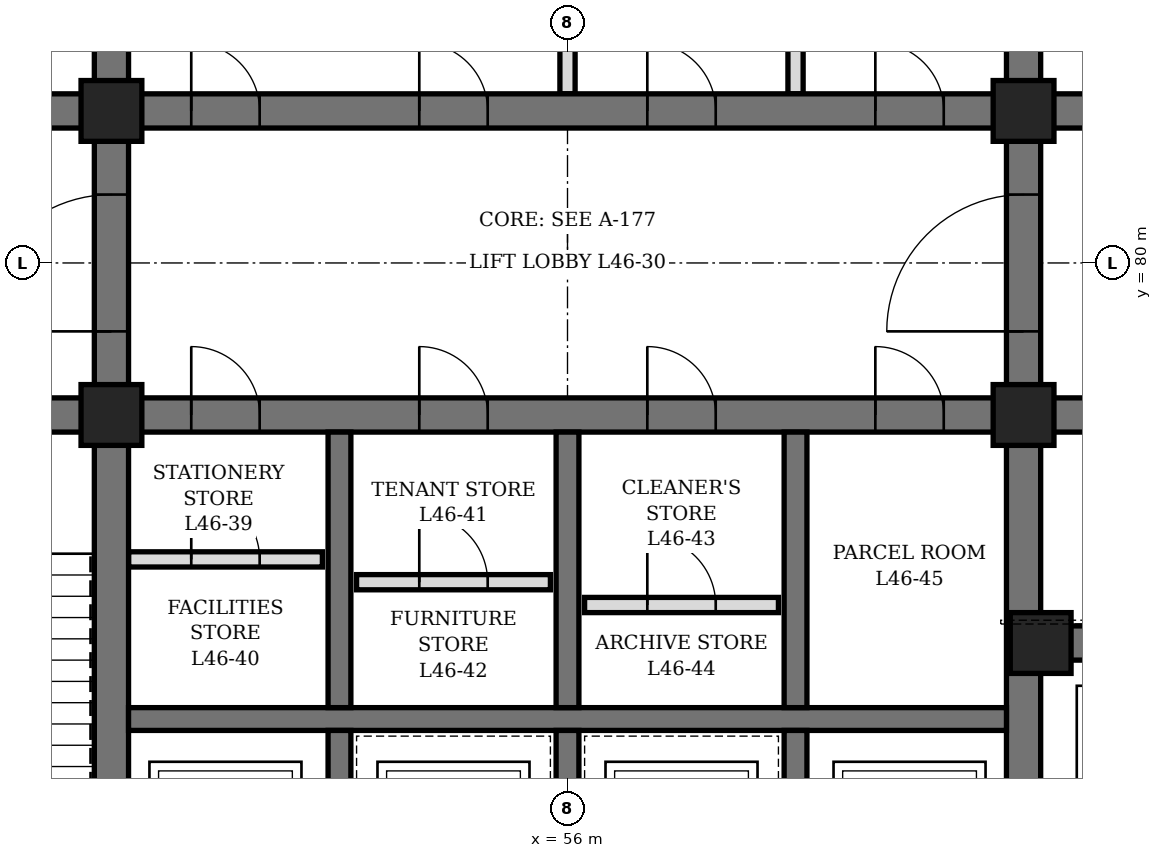
"""IFC4 building model, lengths in metres.
Left out: names, types, materials, properties, quantities, classifications, styles, units other than length and angle.
Written with IfcOpenShell. Run it as: python <this file> out.ifc"""

import sys

from ifc_helpers import new_model, si_unit, direction, frame, frame_2d, origin, origin_2d, place, context, subcontext, project, spatial, rectangle, hollow_rectangle, extrude, element, fill, save


model = new_model("IFC4")
c1 = context("Model", 3, precision=1e-05, world=origin(), true_north=direction((0.0, 1.0)))
c2 = subcontext(c1, "Body", "Model", "MODEL_VIEW")
j1 = project(units=[si_unit("LENGTHUNIT", "METRE"), si_unit("PLANEANGLEUNIT", "RADIAN")], contexts=[c1])
p1 = place(None, origin())
s1 = spatial("IfcSite", under=j1, at=p1, CompositionType="ELEMENT")
p2 = place(p1, origin())
s2 = spatial("IfcBuilding", under=s1, at=p2, CompositionType="ELEMENT")
p3 = place(p2, frame((0.0, 0.0, 206.5)))
s3 = spatial("IfcBuildingStorey", under=s2, at=p3, CompositionType="ELEMENT", Elevation=206.5)
p4 = place(p3, frame((50.0, 71.6, 0.0), z_axis=(0.0, 0.0, 1.0), x_axis=(0.0, 1.0, 0.0)))
e1 = element("IfcWall", 1, at=p4, inside=s3, PredefinedType="SHEAR", context=c2, shape_type="SweptSolid", body=[
    extrude(rectangle(XDim=16.8, YDim=0.45, at=frame_2d((8.4, 0.0))), origin(), (0.0, 0.0, 1.0), 4.2),
])
p5 = place(p4, frame((7.5, 0.0, 0.0)))
e2 = element("IfcOpeningElement", 2, at=p5, cuts=e1, PredefinedType="OPENING", context=c2, shape_type="SweptSolid", body=[
    extrude(rectangle(XDim=1.8, YDim=2.4, at=frame_2d((0.9, 1.2))), frame((0.0, 0.235, 0.0), z_axis=(0.0, -1.0, 0.0), x_axis=(1.0, 0.0, 0.0)), (0.0, 0.0, 1.0), 0.47),
])
p6 = place(p3, frame((62.0, 71.6, 0.0), z_axis=(0.0, 0.0, 1.0), x_axis=(0.0, 1.0, 0.0)))
e3 = element("IfcWall", 3, at=p6, inside=s3, PredefinedType="SHEAR", context=c2, shape_type="SweptSolid", body=[
    extrude(rectangle(XDim=16.8, YDim=0.45, at=frame_2d((8.4, 0.0))), origin(), (0.0, 0.0, 1.0), 4.2),
])
p7 = place(p6, frame((7.5, 0.0, 0.0)))
e4 = element("IfcOpeningElement", 4, at=p7, cuts=e3, PredefinedType="OPENING", context=c2, shape_type="SweptSolid", body=[
    extrude(rectangle(XDim=1.8, YDim=2.4, at=frame_2d((0.9, 1.2))), frame((0.0, 0.235, 0.0), z_axis=(0.0, -1.0, 0.0), x_axis=(1.0, 0.0, 0.0)), (0.0, 0.0, 1.0), 0.47),
])
p8 = place(p3, frame((44.6, 78.0, 0.0), z_axis=(0.0, 0.0, 1.0), x_axis=(1.0, 0.0, 0.0)))
e5 = element("IfcWall", 5, at=p8, inside=s3, PredefinedType="SHEAR", context=c2, shape_type="SweptSolid", body=[
    extrude(rectangle(XDim=5.175, YDim=0.45, at=frame_2d((2.587, 0.0))), origin(), (0.0, 0.0, 1.0), 4.2),
])
p9 = place(p8, frame((1.8, 0.0, 0.0)))
e6 = element("IfcOpeningElement", 6, at=p9, cuts=e5, PredefinedType="OPENING", context=c2, shape_type="SweptSolid", body=[
    extrude(rectangle(XDim=1.2, YDim=2.1, at=frame_2d((0.6, 1.05))), frame((0.0, 0.235, 0.0), z_axis=(0.0, -1.0, 0.0), x_axis=(1.0, 0.0, 0.0)), (0.0, 0.0, 1.0), 0.47),
])
p10 = place(p3, frame((44.6, 82.0, 0.0), z_axis=(0.0, 0.0, 1.0), x_axis=(1.0, 0.0, 0.0)))
e7 = element("IfcWall", 7, at=p10, inside=s3, PredefinedType="SHEAR", context=c2, shape_type="SweptSolid", body=[
    extrude(rectangle(XDim=5.175, YDim=0.45, at=frame_2d((2.587, 0.0))), origin(), (0.0, 0.0, 1.0), 4.2),
])
p11 = place(p10, frame((0.7, 0.0, 0.0)))
e8 = element("IfcOpeningElement", 8, at=p11, cuts=e7, PredefinedType="OPENING", context=c2, shape_type="SweptSolid", body=[
    extrude(rectangle(XDim=0.9, YDim=2.1, at=frame_2d((0.45, 1.05))), frame((0.0, 0.235, 0.0), z_axis=(0.0, -1.0, 0.0), x_axis=(1.0, 0.0, 0.0)), (0.0, 0.0, 1.0), 0.47),
])
p12 = place(p3, frame((62.225, 75.0, 0.0), z_axis=(0.0, 0.0, 1.0), x_axis=(1.0, 0.0, 0.0)))
e9 = element("IfcWall", 9, at=p12, inside=s3, PredefinedType="SHEAR", context=c2, shape_type="SweptSolid", body=[
    extrude(rectangle(XDim=5.175, YDim=0.45, at=frame_2d((2.587, 0.0))), origin(), (0.0, 0.0, 1.0), 4.2),
])
p13 = place(p12, frame((0.675, 0.0, 0.0)))
e10 = element("IfcOpeningElement", 10, at=p13, cuts=e9, PredefinedType="OPENING", context=c2, shape_type="SweptSolid", body=[
    extrude(rectangle(XDim=1.2, YDim=2.2, at=frame_2d((0.6, 1.1))), frame((0.0, 0.235, 0.0), z_axis=(0.0, -1.0, 0.0), x_axis=(1.0, 0.0, 0.0)), (0.0, 0.0, 1.0), 0.47),
])
p14 = place(p12, frame((3.425, 0.0, 0.0)))
e11 = element("IfcOpeningElement", 11, at=p14, cuts=e9, PredefinedType="OPENING", context=c2, shape_type="SweptSolid", body=[
    extrude(rectangle(XDim=1.2, YDim=2.2, at=frame_2d((0.6, 1.1))), frame((0.0, 0.235, 0.0), z_axis=(0.0, -1.0, 0.0), x_axis=(1.0, 0.0, 0.0)), (0.0, 0.0, 1.0), 0.47),
])
p15 = place(p3, frame((62.225, 78.0, 0.0), z_axis=(0.0, 0.0, 1.0), x_axis=(1.0, 0.0, 0.0)))
e12 = element("IfcWall", 12, at=p15, inside=s3, PredefinedType="SHEAR", context=c2, shape_type="SweptSolid", body=[
    extrude(rectangle(XDim=5.175, YDim=0.45, at=frame_2d((2.587, 0.0))), origin(), (0.0, 0.0, 1.0), 4.2),
])
p16 = place(p15, frame((2.175, 0.0, 0.0)))
e13 = element("IfcOpeningElement", 13, at=p16, cuts=e12, PredefinedType="OPENING", context=c2, shape_type="SweptSolid", body=[
    extrude(rectangle(XDim=1.2, YDim=2.1, at=frame_2d((0.6, 1.05))), frame((0.0, 0.235, 0.0), z_axis=(0.0, -1.0, 0.0), x_axis=(1.0, 0.0, 0.0)), (0.0, 0.0, 1.0), 0.47),
])
p17 = place(p3, frame((62.225, 82.0, 0.0), z_axis=(0.0, 0.0, 1.0), x_axis=(1.0, 0.0, 0.0)))
e14 = element("IfcWall", 14, at=p17, inside=s3, PredefinedType="SHEAR", context=c2, shape_type="SweptSolid", body=[
    extrude(rectangle(XDim=5.175, YDim=0.45, at=frame_2d((2.587, 0.0))), origin(), (0.0, 0.0, 1.0), 4.2),
])
p18 = place(p17, frame((2.175, 0.0, 0.0)))
e15 = element("IfcOpeningElement", 15, at=p18, cuts=e14, PredefinedType="OPENING", context=c2, shape_type="SweptSolid", body=[
    extrude(rectangle(XDim=1.2, YDim=2.1, at=frame_2d((0.6, 1.05))), frame((0.0, 0.235, 0.0), z_axis=(0.0, -1.0, 0.0), x_axis=(1.0, 0.0, 0.0)), (0.0, 0.0, 1.0), 0.47),
])
p19 = place(p3, frame((50.225, 78.0, 0.0), z_axis=(0.0, 0.0, 1.0), x_axis=(1.0, 0.0, 0.0)))
e16 = element("IfcWall", 16, at=p19, inside=s3, PredefinedType="SHEAR", context=c2, shape_type="SweptSolid", body=[
    extrude(rectangle(XDim=11.55, YDim=0.45, at=frame_2d((5.775, 0.0))), origin(), (0.0, 0.0, 1.0), 4.2),
])
p20 = place(p19, frame((0.825, 0.0, 0.0)))
e17 = element("IfcOpeningElement", 17, at=p20, cuts=e16, PredefinedType="OPENING", context=c2, shape_type="SweptSolid", body=[
    extrude(rectangle(XDim=0.9, YDim=2.1, at=frame_2d((0.45, 1.05))), frame((0.0, 0.235, 0.0), z_axis=(0.0, -1.0, 0.0), x_axis=(1.0, 0.0, 0.0)), (0.0, 0.0, 1.0), 0.47),
])
p21 = place(p19, frame((3.825, 0.0, 0.0)))
e18 = element("IfcOpeningElement", 18, at=p21, cuts=e16, PredefinedType="OPENING", context=c2, shape_type="SweptSolid", body=[
    extrude(rectangle(XDim=0.9, YDim=2.1, at=frame_2d((0.45, 1.05))), frame((0.0, 0.235, 0.0), z_axis=(0.0, -1.0, 0.0), x_axis=(1.0, 0.0, 0.0)), (0.0, 0.0, 1.0), 0.47),
])
p22 = place(p19, frame((6.825, 0.0, 0.0)))
e19 = element("IfcOpeningElement", 19, at=p22, cuts=e16, PredefinedType="OPENING", context=c2, shape_type="SweptSolid", body=[
    extrude(rectangle(XDim=0.9, YDim=2.1, at=frame_2d((0.45, 1.05))), frame((0.0, 0.235, 0.0), z_axis=(0.0, -1.0, 0.0), x_axis=(1.0, 0.0, 0.0)), (0.0, 0.0, 1.0), 0.47),
])
p23 = place(p19, frame((9.825, 0.0, 0.0)))
e20 = element("IfcOpeningElement", 20, at=p23, cuts=e16, PredefinedType="OPENING", context=c2, shape_type="SweptSolid", body=[
    extrude(rectangle(XDim=0.9, YDim=2.1, at=frame_2d((0.45, 1.05))), frame((0.0, 0.235, 0.0), z_axis=(0.0, -1.0, 0.0), x_axis=(1.0, 0.0, 0.0)), (0.0, 0.0, 1.0), 0.47),
])
p24 = place(p3, frame((50.225, 82.0, 0.0), z_axis=(0.0, 0.0, 1.0), x_axis=(1.0, 0.0, 0.0)))
e21 = element("IfcWall", 21, at=p24, inside=s3, PredefinedType="SHEAR", context=c2, shape_type="SweptSolid", body=[
    extrude(rectangle(XDim=11.55, YDim=0.45, at=frame_2d((5.775, 0.0))), origin(), (0.0, 0.0, 1.0), 4.2),
])
p25 = place(p24, frame((0.825, 0.0, 0.0)))
e22 = element("IfcOpeningElement", 22, at=p25, cuts=e21, PredefinedType="OPENING", context=c2, shape_type="SweptSolid", body=[
    extrude(rectangle(XDim=0.9, YDim=2.1, at=frame_2d((0.45, 1.05))), frame((0.0, 0.235, 0.0), z_axis=(0.0, -1.0, 0.0), x_axis=(1.0, 0.0, 0.0)), (0.0, 0.0, 1.0), 0.47),
])
p26 = place(p24, frame((3.825, 0.0, 0.0)))
e23 = element("IfcOpeningElement", 23, at=p26, cuts=e21, PredefinedType="OPENING", context=c2, shape_type="SweptSolid", body=[
    extrude(rectangle(XDim=0.9, YDim=2.1, at=frame_2d((0.45, 1.05))), frame((0.0, 0.235, 0.0), z_axis=(0.0, -1.0, 0.0), x_axis=(1.0, 0.0, 0.0)), (0.0, 0.0, 1.0), 0.47),
])
p27 = place(p24, frame((6.825, 0.0, 0.0)))
e24 = element("IfcOpeningElement", 24, at=p27, cuts=e21, PredefinedType="OPENING", context=c2, shape_type="SweptSolid", body=[
    extrude(rectangle(XDim=0.9, YDim=2.1, at=frame_2d((0.45, 1.05))), frame((0.0, 0.235, 0.0), z_axis=(0.0, -1.0, 0.0), x_axis=(1.0, 0.0, 0.0)), (0.0, 0.0, 1.0), 0.47),
])
p28 = place(p24, frame((9.825, 0.0, 0.0)))
e25 = element("IfcOpeningElement", 25, at=p28, cuts=e21, PredefinedType="OPENING", context=c2, shape_type="SweptSolid", body=[
    extrude(rectangle(XDim=0.9, YDim=2.1, at=frame_2d((0.45, 1.05))), frame((0.0, 0.235, 0.0), z_axis=(0.0, -1.0, 0.0), x_axis=(1.0, 0.0, 0.0)), (0.0, 0.0, 1.0), 0.47),
])
p29 = place(p3, frame((50.225, 74.0, 0.0), z_axis=(0.0, 0.0, 1.0), x_axis=(1.0, 0.0, 0.0)))
e26 = element("IfcWall", 26, at=p29, inside=s3, PredefinedType="SHEAR", context=c2, shape_type="SweptSolid", body=[
    extrude(rectangle(XDim=11.55, YDim=0.3, at=frame_2d((5.775, 0.0))), origin(), (0.0, 0.0, 1.0), 4.2),
])
p30 = place(p3, frame((53.0, 71.6, 0.0), z_axis=(0.0, 0.0, 1.0), x_axis=(0.0, 1.0, 0.0)))
e27 = element("IfcWall", 27, at=p30, inside=s3, PredefinedType="SHEAR", context=c2, shape_type="SweptSolid", body=[
    extrude(rectangle(XDim=2.25, YDim=0.3, at=frame_2d((1.125, 0.0))), origin(), (0.0, 0.0, 1.0), 4.2),
])
p31 = place(p3, frame((53.0, 74.15, 0.0), z_axis=(0.0, 0.0, 1.0), x_axis=(0.0, 1.0, 0.0)))
e28 = element("IfcWall", 28, at=p31, inside=s3, PredefinedType="SHEAR", context=c2, shape_type="SweptSolid", body=[
    extrude(rectangle(XDim=3.625, YDim=0.3, at=frame_2d((1.812, 0.0))), origin(), (0.0, 0.0, 1.0), 4.2),
])
p32 = place(p3, frame((56.0, 71.6, 0.0), z_axis=(0.0, 0.0, 1.0), x_axis=(0.0, 1.0, 0.0)))
e29 = element("IfcWall", 29, at=p32, inside=s3, PredefinedType="SHEAR", context=c2, shape_type="SweptSolid", body=[
    extrude(rectangle(XDim=2.25, YDim=0.3, at=frame_2d((1.125, 0.0))), origin(), (0.0, 0.0, 1.0), 4.2),
])
p33 = place(p3, frame((56.0, 74.15, 0.0), z_axis=(0.0, 0.0, 1.0), x_axis=(0.0, 1.0, 0.0)))
e30 = element("IfcWall", 30, at=p33, inside=s3, PredefinedType="SHEAR", context=c2, shape_type="SweptSolid", body=[
    extrude(rectangle(XDim=3.625, YDim=0.3, at=frame_2d((1.812, 0.0))), origin(), (0.0, 0.0, 1.0), 4.2),
])
p34 = place(p3, frame((59.0, 71.6, 0.0), z_axis=(0.0, 0.0, 1.0), x_axis=(0.0, 1.0, 0.0)))
e31 = element("IfcWall", 31, at=p34, inside=s3, PredefinedType="SHEAR", context=c2, shape_type="SweptSolid", body=[
    extrude(rectangle(XDim=2.25, YDim=0.3, at=frame_2d((1.125, 0.0))), origin(), (0.0, 0.0, 1.0), 4.2),
])
p35 = place(p3, frame((59.0, 74.15, 0.0), z_axis=(0.0, 0.0, 1.0), x_axis=(0.0, 1.0, 0.0)))
e32 = element("IfcWall", 32, at=p35, inside=s3, PredefinedType="SHEAR", context=c2, shape_type="SweptSolid", body=[
    extrude(rectangle(XDim=3.625, YDim=0.3, at=frame_2d((1.812, 0.0))), origin(), (0.0, 0.0, 1.0), 4.2),
])
for number, where, z_axis, x_axis in (
    (33, (50.0, 78.0, 0.0), (0.0, 0.0, 1.0), (1.0, 0.0, 0.0)),
    (34, (50.0, 82.0, 0.0), (0.0, 0.0, 1.0), (1.0, 0.0, 0.0)),
    (35, (62.0, 78.0, 0.0), (0.0, 0.0, 1.0), (1.0, 0.0, 0.0)),
    (36, (62.0, 82.0, 0.0), (0.0, 0.0, 1.0), (1.0, 0.0, 0.0)),
    (37, (62.225, 75.0, 0.0), (0.0, 0.0, 1.0), (1.0, 0.0, 0.0)),
):
    element("IfcColumn", number, at=place(p3, frame(where, z_axis=z_axis, x_axis=x_axis)), inside=s3, PredefinedType="COLUMN", context=c2, shape_type="SweptSolid", body=[
        extrude(hollow_rectangle(XDim=0.8, YDim=0.8, WallThickness=0.1, at=origin_2d()), origin(), (0.0, 0.0, 1.0), 4.2),
    ])
p36 = place(p3, frame((50.225, 76.1, 0.0), z_axis=(0.0, 0.0, 1.0), x_axis=(1.0, 0.0, 0.0)))
e38 = element("IfcWall", 38, at=p36, inside=s3, PredefinedType="PARTITIONING", context=c2, shape_type="SweptSolid", body=[
    extrude(rectangle(XDim=2.55, YDim=0.2, at=frame_2d((1.275, 0.0))), origin(), (0.0, 0.0, 1.0), 4.04),
])
p37 = place(p36, frame((0.825, 0.0, 0.0)))
e39 = element("IfcOpeningElement", 39, at=p37, cuts=e38, PredefinedType="OPENING", context=c2, shape_type="SweptSolid", body=[
    extrude(rectangle(XDim=0.9, YDim=2.1, at=frame_2d((0.45, 1.05))), frame((0.0, 0.11, 0.0), z_axis=(0.0, -1.0, 0.0), x_axis=(1.0, 0.0, 0.0)), (0.0, 0.0, 1.0), 0.22),
])
p38 = place(p3, frame((53.225, 75.8, 0.0), z_axis=(0.0, 0.0, 1.0), x_axis=(1.0, 0.0, 0.0)))
e40 = element("IfcWall", 40, at=p38, inside=s3, PredefinedType="PARTITIONING", context=c2, shape_type="SweptSolid", body=[
    extrude(rectangle(XDim=2.55, YDim=0.2, at=frame_2d((1.275, 0.0))), origin(), (0.0, 0.0, 1.0), 4.04),
])
p39 = place(p38, frame((0.825, 0.0, 0.0)))
e41 = element("IfcOpeningElement", 41, at=p39, cuts=e40, PredefinedType="OPENING", context=c2, shape_type="SweptSolid", body=[
    extrude(rectangle(XDim=0.9, YDim=2.1, at=frame_2d((0.45, 1.05))), frame((0.0, 0.11, 0.0), z_axis=(0.0, -1.0, 0.0), x_axis=(1.0, 0.0, 0.0)), (0.0, 0.0, 1.0), 0.22),
])
p40 = place(p3, frame((56.225, 75.5, 0.0), z_axis=(0.0, 0.0, 1.0), x_axis=(1.0, 0.0, 0.0)))
e42 = element("IfcWall", 42, at=p40, inside=s3, PredefinedType="PARTITIONING", context=c2, shape_type="SweptSolid", body=[
    extrude(rectangle(XDim=2.55, YDim=0.2, at=frame_2d((1.275, 0.0))), origin(), (0.0, 0.0, 1.0), 4.04),
])
p41 = place(p40, frame((0.825, 0.0, 0.0)))
e43 = element("IfcOpeningElement", 43, at=p41, cuts=e42, PredefinedType="OPENING", context=c2, shape_type="SweptSolid", body=[
    extrude(rectangle(XDim=0.9, YDim=2.1, at=frame_2d((0.45, 1.05))), frame((0.0, 0.11, 0.0), z_axis=(0.0, -1.0, 0.0), x_axis=(1.0, 0.0, 0.0)), (0.0, 0.0, 1.0), 0.22),
])
p42 = place(p3, frame((56.0, 82.225, 0.0), z_axis=(0.0, 0.0, 1.0), x_axis=(0.0, 1.0, 0.0)))
e44 = element("IfcWall", 44, at=p42, inside=s3, PredefinedType="PARTITIONING", context=c2, shape_type="SweptSolid", body=[
    extrude(rectangle(XDim=3.55, YDim=0.2, at=frame_2d((1.775, 0.0))), origin(), (0.0, 0.0, 1.0), 3.14),
])
p43 = place(p3, frame((59.0, 82.225, 0.0), z_axis=(0.0, 0.0, 1.0), x_axis=(0.0, 1.0, 0.0)))
e45 = element("IfcWall", 45, at=p43, inside=s3, PredefinedType="PARTITIONING", context=c2, shape_type="SweptSolid", body=[
    extrude(rectangle(XDim=3.55, YDim=0.2, at=frame_2d((1.775, 0.0))), origin(), (0.0, 0.0, 1.0), 4.04),
])
p44 = place(p20, origin())
e46 = element("IfcDoor", 46, at=p44, inside=s3, OperationType="SINGLE_SWING_LEFT", PredefinedType="DOOR", context=c2, shape_type="SweptSolid", body=[
    extrude(rectangle(XDim=0.9, YDim=2.1, at=frame_2d((0.45, 1.05))), frame((0.0, 0.225, 0.0), z_axis=(0.0, -1.0, 0.0), x_axis=(1.0, 0.0, 0.0)), (0.0, 0.0, 1.0), 0.449),
])
fill(e17, e46)
p45 = place(p37, origin())
e47 = element("IfcDoor", 47, at=p45, inside=s3, OperationType="SINGLE_SWING_LEFT", PredefinedType="DOOR", context=c2, shape_type="SweptSolid", body=[
    extrude(rectangle(XDim=0.9, YDim=2.1, at=frame_2d((0.45, 1.05))), frame((0.0, 0.1, 0.0), z_axis=(0.0, -1.0, 0.0), x_axis=(1.0, 0.0, 0.0)), (0.0, 0.0, 1.0), 0.199),
])
fill(e39, e47)
p46 = place(p21, origin())
e48 = element("IfcDoor", 48, at=p46, inside=s3, OperationType="SINGLE_SWING_LEFT", PredefinedType="DOOR", context=c2, shape_type="SweptSolid", body=[
    extrude(rectangle(XDim=0.9, YDim=2.1, at=frame_2d((0.45, 1.05))), frame((0.0, 0.225, 0.0), z_axis=(0.0, -1.0, 0.0), x_axis=(1.0, 0.0, 0.0)), (0.0, 0.0, 1.0), 0.449),
])
fill(e18, e48)
p47 = place(p39, origin())
e49 = element("IfcDoor", 49, at=p47, inside=s3, OperationType="SINGLE_SWING_LEFT", PredefinedType="DOOR", context=c2, shape_type="SweptSolid", body=[
    extrude(rectangle(XDim=0.9, YDim=2.1, at=frame_2d((0.45, 1.05))), frame((0.0, 0.1, 0.0), z_axis=(0.0, -1.0, 0.0), x_axis=(1.0, 0.0, 0.0)), (0.0, 0.0, 1.0), 0.199),
])
fill(e41, e49)
p48 = place(p22, origin())
e50 = element("IfcDoor", 50, at=p48, inside=s3, OperationType="SINGLE_SWING_LEFT", PredefinedType="DOOR", context=c2, shape_type="SweptSolid", body=[
    extrude(rectangle(XDim=0.9, YDim=2.1, at=frame_2d((0.45, 1.05))), frame((0.0, 0.225, 0.0), z_axis=(0.0, -1.0, 0.0), x_axis=(1.0, 0.0, 0.0)), (0.0, 0.0, 1.0), 0.449),
])
fill(e19, e50)
p49 = place(p41, origin())
e51 = element("IfcDoor", 51, at=p49, inside=s3, OperationType="SINGLE_SWING_LEFT", PredefinedType="DOOR", context=c2, shape_type="SweptSolid", body=[
    extrude(rectangle(XDim=0.9, YDim=2.1, at=frame_2d((0.45, 1.05))), frame((0.0, 0.1, 0.0), z_axis=(0.0, -1.0, 0.0), x_axis=(1.0, 0.0, 0.0)), (0.0, 0.0, 1.0), 0.199),
])
fill(e43, e51)
p50 = place(p23, origin())
e52 = element("IfcDoor", 52, at=p50, inside=s3, OperationType="SINGLE_SWING_LEFT", PredefinedType="DOOR", context=c2, shape_type="SweptSolid", body=[
    extrude(rectangle(XDim=0.9, YDim=2.1, at=frame_2d((0.45, 1.05))), frame((0.0, 0.225, 0.0), z_axis=(0.0, -1.0, 0.0), x_axis=(1.0, 0.0, 0.0)), (0.0, 0.0, 1.0), 0.449),
])
fill(e20, e52)
p51 = place(p25, origin())
e53 = element("IfcDoor", 53, at=p51, inside=s3, OperationType="SINGLE_SWING_LEFT", PredefinedType="DOOR", context=c2, shape_type="SweptSolid", body=[
    extrude(rectangle(XDim=0.9, YDim=2.1, at=frame_2d((0.45, 1.05))), frame((0.0, 0.225, 0.0), z_axis=(0.0, -1.0, 0.0), x_axis=(1.0, 0.0, 0.0)), (0.0, 0.0, 1.0), 0.449),
])
fill(e22, e53)
p52 = place(p26, origin())
e54 = element("IfcDoor", 54, at=p52, inside=s3, OperationType="SINGLE_SWING_LEFT", PredefinedType="DOOR", context=c2, shape_type="SweptSolid", body=[
    extrude(rectangle(XDim=0.9, YDim=2.1, at=frame_2d((0.45, 1.05))), frame((0.0, 0.225, 0.0), z_axis=(0.0, -1.0, 0.0), x_axis=(1.0, 0.0, 0.0)), (0.0, 0.0, 1.0), 0.449),
])
fill(e23, e54)
p53 = place(p27, origin())
e55 = element("IfcDoor", 55, at=p53, inside=s3, OperationType="SINGLE_SWING_LEFT", PredefinedType="DOOR", context=c2, shape_type="SweptSolid", body=[
    extrude(rectangle(XDim=0.9, YDim=2.1, at=frame_2d((0.45, 1.05))), frame((0.0, 0.225, 0.0), z_axis=(0.0, -1.0, 0.0), x_axis=(1.0, 0.0, 0.0)), (0.0, 0.0, 1.0), 0.449),
])
fill(e24, e55)
p54 = place(p28, origin())
e56 = element("IfcDoor", 56, at=p54, inside=s3, OperationType="SINGLE_SWING_LEFT", PredefinedType="DOOR", context=c2, shape_type="SweptSolid", body=[
    extrude(rectangle(XDim=0.9, YDim=2.1, at=frame_2d((0.45, 1.05))), frame((0.0, 0.225, 0.0), z_axis=(0.0, -1.0, 0.0), x_axis=(1.0, 0.0, 0.0)), (0.0, 0.0, 1.0), 0.449),
])
fill(e25, e56)
p55 = place(p5, origin())
e57 = element("IfcDoor", 57, at=p55, inside=s3, OperationType="DOUBLE_DOOR_SINGLE_SWING", PredefinedType="DOOR", context=c2, shape_type="SweptSolid", body=[
    extrude(rectangle(XDim=1.8, YDim=2.4, at=frame_2d((0.9, 1.2))), frame((0.0, 0.225, 0.0), z_axis=(0.0, -1.0, 0.0), x_axis=(1.0, 0.0, 0.0)), (0.0, 0.0, 1.0), 0.449),
])
fill(e2, e57)
p56 = place(p7, origin())
e58 = element("IfcDoor", 58, at=p56, inside=s3, OperationType="DOUBLE_DOOR_SINGLE_SWING", PredefinedType="DOOR", context=c2, shape_type="SweptSolid", body=[
    extrude(rectangle(XDim=1.8, YDim=2.4, at=frame_2d((0.9, 1.2))), frame((0.0, 0.225, 0.0), z_axis=(0.0, -1.0, 0.0), x_axis=(1.0, 0.0, 0.0)), (0.0, 0.0, 1.0), 0.449),
])
fill(e4, e58)
save(model, sys.argv[1])
